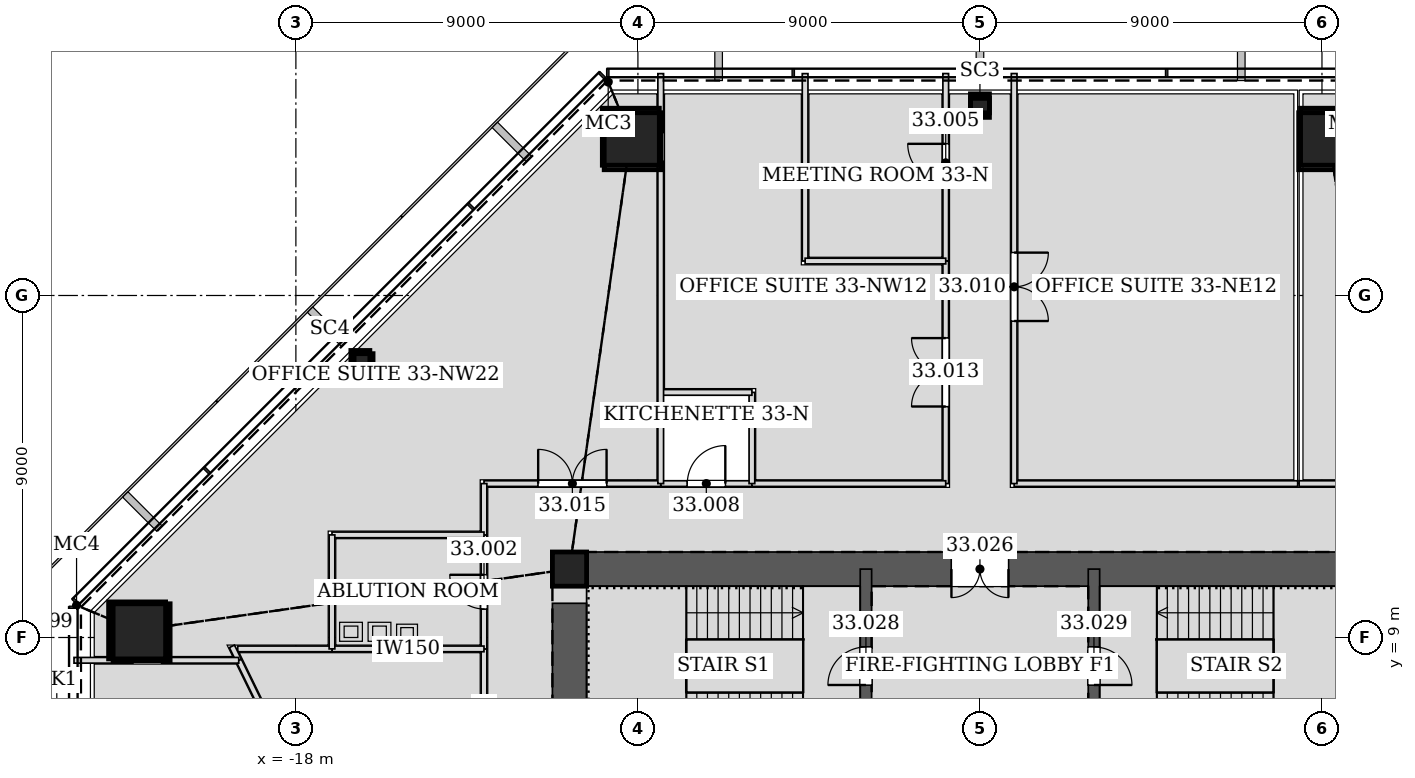
"""IFC4 building model, lengths in metres.
Left out: names, types, materials, properties, quantities, classifications, styles, units other than length and angle.
Written with IfcOpenShell. Run it as: python <this file> out.ifc"""

import sys

from ifc_helpers import new_model, si_unit, direction, frame, frame_2d, origin, origin_2d, place, context, subcontext, project, spatial, rectangle, hollow_rectangle, extrude, element, fill, save


model = new_model("IFC4")
c1 = context("Model", 3, precision=1e-05, world=origin(), true_north=direction((0.0, 1.0)))
c2 = subcontext(c1, "Body", "Model", "MODEL_VIEW")
j1 = project(units=[si_unit("LENGTHUNIT", "METRE"), si_unit("PLANEANGLEUNIT", "RADIAN")], contexts=[c1])
p1 = place(None, origin())
s1 = spatial("IfcSite", under=j1, at=p1, CompositionType="ELEMENT")
p2 = place(p1, origin())
s2 = spatial("IfcBuilding", under=s1, at=p2, CompositionType="ELEMENT")
p3 = place(p2, frame((0.0, 0.0, 147.0)))
s3 = spatial("IfcBuildingStorey", under=s2, at=p3, CompositionType="ELEMENT", Elevation=147.0)
for number, where, z_axis, x_axis in (
    (1, (9.187, 22.178, 0.0), (-0.012, -0.028, 1.0), (0.923, -0.384, 0.0)),
    (2, (-9.187, 22.178, 0.0), (0.012, -0.028, 1.0), (0.923, 0.384, 0.0)),
    (3, (-22.178, 9.187, 0.0), (0.028, -0.012, 1.0), (0.384, 0.923, 0.0)),
):
    element("IfcColumn", number, at=place(p3, frame(where, z_axis=z_axis, x_axis=x_axis)), inside=s3, PredefinedType="COLUMN", context=c2, shape_type="SweptSolid", body=[
        extrude(hollow_rectangle(XDim=1.5, YDim=1.5, WallThickness=0.07, at=origin_2d()), origin(), (0.0, 0.0, 1.0), 4.202),
    ])
for number, where, z_axis, x_axis in (
    (4, (0.0, 23.056, 0.0), (0.0, -0.028, 1.0), (1.0, 0.0, 0.0)),
    (5, (-16.303, 16.303, 0.0), (0.02, -0.02, 1.0), (0.707, 0.707, 0.0)),
):
    element("IfcColumn", number, at=place(p3, frame(where, z_axis=z_axis, x_axis=x_axis)), inside=s3, PredefinedType="COLUMN", context=c2, shape_type="SweptSolid", body=[
        extrude(hollow_rectangle(XDim=0.5, YDim=0.5, WallThickness=0.025, at=origin_2d()), origin(), (0.0, 0.0, 1.0), 4.202),
    ])
p4 = place(p3, frame((-10.8, 10.8, 0.0), z_axis=(0.0, 0.0, 1.0), x_axis=(1.0, 0.0, 0.0)))
e6 = element("IfcColumn", 6, at=p4, inside=s3, PredefinedType="COLUMN", context=c2, shape_type="SweptSolid", body=[
    extrude(hollow_rectangle(XDim=0.9, YDim=0.9, WallThickness=0.06, at=origin_2d()), origin(), (0.0, 0.0, 1.0), 4.2),
])
p5 = place(p3, frame((10.8, 10.8, 0.0), z_axis=(0.0, 0.0, 1.0), x_axis=(-1.0, 0.0, 0.0)))
e7 = element("IfcWall", 7, at=p5, inside=s3, PredefinedType="SOLIDWALL", context=c2, shape_type="SweptSolid", body=[
    extrude(rectangle(XDim=21.6, YDim=0.9, at=frame_2d((10.8, 0.0))), origin(), (0.0, 0.0, 1.0), 4.2),
])
p6 = place(p5, frame((10.05, 0.0, 0.0)))
e8 = element("IfcOpeningElement", 8, at=p6, cuts=e7, PredefinedType="OPENING", context=c2, shape_type="SweptSolid", body=[
    extrude(rectangle(XDim=1.5, YDim=2.1, at=frame_2d((0.75, 1.05))), frame((0.0, 0.46, 0.0), z_axis=(0.0, -1.0, 0.0), x_axis=(1.0, 0.0, 0.0)), (0.0, 0.0, 1.0), 0.92),
])
p7 = place(p3, frame((-10.8, 10.8, 0.0), z_axis=(0.0, 0.0, 1.0), x_axis=(0.0, -1.0, 0.0)))
e9 = element("IfcWall", 9, at=p7, inside=s3, PredefinedType="SOLIDWALL", context=c2, shape_type="SweptSolid", body=[
    extrude(rectangle(XDim=21.6, YDim=0.9, at=frame_2d((10.8, 0.0))), origin(), (0.0, 0.0, 1.0), 4.2),
])
p8 = place(p7, frame((8.7, 0.0, 0.0)))
e10 = element("IfcOpeningElement", 10, at=p8, cuts=e9, PredefinedType="OPENING", context=c2, shape_type="SweptSolid", body=[
    extrude(rectangle(XDim=1.2, YDim=2.1, at=frame_2d((0.6, 1.05))), frame((0.0, 0.46, 0.0), z_axis=(0.0, -1.0, 0.0), x_axis=(1.0, 0.0, 0.0)), (0.0, 0.0, 1.0), 0.92),
])
p9 = place(p7, frame((11.7, 0.0, 0.0)))
e11 = element("IfcOpeningElement", 11, at=p9, cuts=e9, PredefinedType="OPENING", context=c2, shape_type="SweptSolid", body=[
    extrude(rectangle(XDim=1.2, YDim=2.1, at=frame_2d((0.6, 1.05))), frame((0.0, 0.46, 0.0), z_axis=(0.0, -1.0, 0.0), x_axis=(1.0, 0.0, 0.0)), (0.0, 0.0, 1.0), 0.92),
])
p10 = place(p3, frame((-3.0, 6.0, 0.0), z_axis=(0.0, 0.0, 1.0), x_axis=(0.0, 1.0, 0.0)))
e12 = element("IfcWall", 12, at=p10, inside=s3, PredefinedType="SOLIDWALL", context=c2, shape_type="SweptSolid", body=[
    extrude(rectangle(XDim=4.8, YDim=0.3, at=frame_2d((2.4, 0.0))), origin(), (0.0, 0.0, 1.0), 4.2),
])
p11 = place(p10, frame((1.75, 0.0, 0.0)))
e13 = element("IfcOpeningElement", 13, at=p11, cuts=e12, PredefinedType="OPENING", context=c2, shape_type="SweptSolid", body=[
    extrude(rectangle(XDim=1.0, YDim=2.1, at=frame_2d((0.5, 1.05))), frame((0.0, 0.16, 0.0), z_axis=(0.0, -1.0, 0.0), x_axis=(1.0, 0.0, 0.0)), (0.0, 0.0, 1.0), 0.32),
])
p12 = place(p3, frame((3.0, 6.0, 0.0), z_axis=(0.0, 0.0, 1.0), x_axis=(0.0, 1.0, 0.0)))
e14 = element("IfcWall", 14, at=p12, inside=s3, PredefinedType="SOLIDWALL", context=c2, shape_type="SweptSolid", body=[
    extrude(rectangle(XDim=4.8, YDim=0.3, at=frame_2d((2.4, 0.0))), origin(), (0.0, 0.0, 1.0), 4.2),
])
p13 = place(p12, frame((1.75, 0.0, 0.0)))
e15 = element("IfcOpeningElement", 15, at=p13, cuts=e14, PredefinedType="OPENING", context=c2, shape_type="SweptSolid", body=[
    extrude(rectangle(XDim=1.0, YDim=2.1, at=frame_2d((0.5, 1.05))), frame((0.0, 0.16, 0.0), z_axis=(0.0, -1.0, 0.0), x_axis=(1.0, 0.0, 0.0)), (0.0, 0.0, 1.0), 0.32),
])
p14 = place(p3, frame((-13.05, 8.701, 0.0), z_axis=(0.0, 0.0, 1.0), x_axis=(0.0, -1.0, 0.0)))
e16 = element("IfcWall", 16, at=p14, inside=s3, PredefinedType="PARTITIONING", context=c2, shape_type="SweptSolid", body=[
    extrude(rectangle(XDim=7.801, YDim=0.15, at=frame_2d((3.9, 0.0))), origin(), (0.0, 0.0, 1.0), 4.035),
])
p15 = place(p14, frame((3.4, 0.0, 0.0)))
e17 = element("IfcOpeningElement", 17, at=p15, cuts=e16, PredefinedType="OPENING", context=c2, shape_type="SweptSolid", body=[
    extrude(rectangle(XDim=1.0, YDim=2.1, at=frame_2d((0.5, 1.05))), frame((0.0, 0.085, 0.0), z_axis=(0.0, -1.0, 0.0), x_axis=(1.0, 0.0, 0.0)), (0.0, 0.0, 1.0), 0.17),
])
p16 = place(p3, frame((-13.05, 11.701, 0.0), z_axis=(0.0, 0.0, 1.0), x_axis=(0.0, -1.0, 0.0)))
e18 = element("IfcWall", 18, at=p16, inside=s3, PredefinedType="PARTITIONING", context=c2, shape_type="SweptSolid", body=[
    extrude(rectangle(XDim=3.002, YDim=0.15, at=frame_2d((1.501, 0.0))), origin(), (0.0, 0.0, 1.0), 3.098),
])
p17 = place(p16, frame((1.051, 0.0, 0.0)))
e19 = element("IfcOpeningElement", 19, at=p17, cuts=e18, PredefinedType="OPENING", context=c2, shape_type="SweptSolid", body=[
    extrude(rectangle(XDim=0.9, YDim=2.1, at=frame_2d((0.45, 1.05))), frame((0.0, 0.085, 0.0), z_axis=(0.0, -1.0, 0.0), x_axis=(1.0, 0.0, 0.0)), (0.0, 0.0, 1.0), 0.17),
])
p18 = place(p3, frame((-0.9, 23.84, 0.0), z_axis=(0.0, 0.0, 1.0), x_axis=(0.0, -1.0, 0.0)))
e20 = element("IfcWall", 20, at=p18, inside=s3, PredefinedType="PARTITIONING", context=c2, shape_type="SweptSolid", body=[
    extrude(rectangle(XDim=4.935, YDim=0.15, at=frame_2d((2.468, 0.0))), origin(), (0.0, 0.0, 1.0), 3.426),
])
p19 = place(p18, frame((1.85, 0.0, 0.0)))
e21 = element("IfcOpeningElement", 21, at=p19, cuts=e20, PredefinedType="OPENING", context=c2, shape_type="SweptSolid", body=[
    extrude(rectangle(XDim=1.0, YDim=2.1, at=frame_2d((0.5, 1.05))), frame((0.0, 0.085, 0.0), z_axis=(0.0, -1.0, 0.0), x_axis=(1.0, 0.0, 0.0)), (0.0, 0.0, 1.0), 0.17),
])
p20 = place(p3, frame((-5.999, 13.05, 0.0), z_axis=(0.0, 0.0, 1.0), x_axis=(-1.0, 0.0, 0.0)))
e22 = element("IfcWall", 22, at=p20, inside=s3, PredefinedType="PARTITIONING", context=c2, shape_type="SweptSolid", body=[
    extrude(rectangle(XDim=2.402, YDim=0.15, at=frame_2d((1.201, 0.0))), origin(), (0.0, 0.0, 1.0), 4.035),
])
p21 = place(p20, frame((0.701, 0.0, 0.0)))
e23 = element("IfcOpeningElement", 23, at=p21, cuts=e22, PredefinedType="OPENING", context=c2, shape_type="SweptSolid", body=[
    extrude(rectangle(XDim=1.0, YDim=2.1, at=frame_2d((0.5, 1.05))), frame((0.0, 0.085, 0.0), z_axis=(0.0, -1.0, 0.0), x_axis=(1.0, 0.0, 0.0)), (0.0, 0.0, 1.0), 0.17),
])
p22 = place(p3, frame((8.361, 13.05, 0.0), z_axis=(0.0, 0.0, 1.0), x_axis=(-1.0, 0.0, 0.0)))
e24 = element("IfcWall", 24, at=p22, inside=s3, PredefinedType="PARTITIONING", context=c2, shape_type="SweptSolid", body=[
    extrude(rectangle(XDim=7.461, YDim=0.15, at=frame_2d((3.73, 0.0))), origin(), (0.0, 0.0, 1.0), 4.035),
])
p23 = place(p3, frame((0.9, 13.05, 0.0), z_axis=(0.0, 0.0, 1.0), x_axis=(0.0, 1.0, 0.0)))
e25 = element("IfcWall", 25, at=p23, inside=s3, PredefinedType="PARTITIONING", context=c2, shape_type="SweptSolid", body=[
    extrude(rectangle(XDim=10.79, YDim=0.15, at=frame_2d((5.395, 0.0))), origin(), (0.0, 0.0, 1.0), 3.426),
])
p24 = place(p23, frame((4.278, 0.0, 0.0)))
e26 = element("IfcOpeningElement", 26, at=p24, cuts=e25, PredefinedType="OPENING", context=c2, shape_type="SweptSolid", body=[
    extrude(rectangle(XDim=1.8, YDim=2.4, at=frame_2d((0.9, 1.2))), frame((0.0, 0.085, 0.0), z_axis=(0.0, -1.0, 0.0), x_axis=(1.0, 0.0, 0.0)), (0.0, 0.0, 1.0), 0.17),
])
p25 = place(p3, frame((13.05, 13.05, 0.0), z_axis=(0.0, 0.0, 1.0), x_axis=(-1.0, 0.0, 0.0)))
e27 = element("IfcWall", 27, at=p25, inside=s3, PredefinedType="PARTITIONING", context=c2, shape_type="SweptSolid", body=[
    extrude(rectangle(XDim=4.651, YDim=0.15, at=frame_2d((2.326, 0.0))), origin(), (0.0, 0.0, 1.0), 3.098),
])
p26 = place(p3, frame((-0.9, 18.907, 0.0), z_axis=(0.0, 0.0, 1.0), x_axis=(0.0, -1.0, 0.0)))
e28 = element("IfcWall", 28, at=p26, inside=s3, PredefinedType="PARTITIONING", context=c2, shape_type="SweptSolid", body=[
    extrude(rectangle(XDim=5.857, YDim=0.15, at=frame_2d((2.929, 0.0))), origin(), (0.0, 0.0, 1.0), 3.426),
])
p27 = place(p26, frame((2.029, 0.0, 0.0)))
e29 = element("IfcOpeningElement", 29, at=p27, cuts=e28, PredefinedType="OPENING", context=c2, shape_type="SweptSolid", body=[
    extrude(rectangle(XDim=1.8, YDim=2.4, at=frame_2d((0.9, 1.2))), frame((0.0, 0.085, 0.0), z_axis=(0.0, -1.0, 0.0), x_axis=(1.0, 0.0, 0.0)), (0.0, 0.0, 1.0), 0.17),
])
p28 = place(p3, frame((-0.9, 13.05, 0.0), z_axis=(0.0, 0.0, 1.0), x_axis=(-1.0, 0.0, 0.0)))
e30 = element("IfcWall", 30, at=p28, inside=s3, PredefinedType="PARTITIONING", context=c2, shape_type="SweptSolid", body=[
    extrude(rectangle(XDim=5.101, YDim=0.15, at=frame_2d((2.551, 0.0))), origin(), (0.0, 0.0, 1.0), 4.035),
])
p29 = place(p3, frame((-8.399, 13.05, 0.0), z_axis=(0.0, 0.0, 1.0), x_axis=(-1.0, 0.0, 0.0)))
e31 = element("IfcWall", 31, at=p29, inside=s3, PredefinedType="PARTITIONING", context=c2, shape_type="SweptSolid", body=[
    extrude(rectangle(XDim=4.651, YDim=0.15, at=frame_2d((2.326, 0.0))), origin(), (0.0, 0.0, 1.0), 3.098),
])
p30 = place(p29, frame((1.426, 0.0, 0.0)))
e32 = element("IfcOpeningElement", 32, at=p30, cuts=e31, PredefinedType="OPENING", context=c2, shape_type="SweptSolid", body=[
    extrude(rectangle(XDim=1.8, YDim=2.4, at=frame_2d((0.9, 1.2))), frame((0.0, 0.085, 0.0), z_axis=(0.0, -1.0, 0.0), x_axis=(1.0, 0.0, 0.0)), (0.0, 0.0, 1.0), 0.17),
])
p31 = place(p3, frame((-13.05, 13.05, 0.0), z_axis=(0.0, 0.0, 1.0), x_axis=(0.0, -1.0, 0.0)))
e33 = element("IfcWall", 33, at=p31, inside=s3, PredefinedType="PARTITIONING", context=c2, shape_type="SweptSolid", body=[
    extrude(rectangle(XDim=1.351, YDim=0.15, at=frame_2d((0.676, 0.0))), origin(), (0.0, 0.0, 1.0), 3.263),
])
p32 = place(p3, frame((-13.05, 8.7, 0.0), z_axis=(0.0, 0.0, 1.0), x_axis=(-1.0, 0.0, 0.0)))
e34 = element("IfcWall", 34, at=p32, inside=s3, PredefinedType="PARTITIONING", context=c2, shape_type="SweptSolid", body=[
    extrude(rectangle(XDim=4.001, YDim=0.15, at=frame_2d((2.0, 0.0))), origin(), (0.0, 0.0, 1.0), 3.426),
])
p33 = place(p3, frame((-19.503, 8.398, 0.0), z_axis=(0.0, 0.0, 1.0), x_axis=(0.438377506249, -0.898790944555, 0.0)))
e35 = element("IfcWall", 35, at=p33, inside=s3, PredefinedType="PARTITIONING", context=c2, shape_type="SweptSolid", body=[
    extrude(rectangle(XDim=8.343, YDim=0.15, at=frame_2d((4.171, 0.0))), origin(), (0.0, 0.0, 1.0), 3.499),
])
p34 = place(p3, frame((-17.049, 8.7, 0.0), z_axis=(0.0, 0.0, 1.0), x_axis=(-1.0, 0.0, 0.0)))
e36 = element("IfcWall", 36, at=p34, inside=s3, PredefinedType="PARTITIONING", context=c2, shape_type="SweptSolid", body=[
    extrude(rectangle(XDim=2.481, YDim=0.15, at=frame_2d((1.24, 0.0))), origin(), (0.0, 0.0, 1.0), 3.499),
])
p35 = place(p3, frame((-19.683, 8.767, 0.0), z_axis=(0.0, 0.0, 1.0), x_axis=(0.438376691605, -0.898791341891, 0.0)))
e37 = element("IfcWall", 37, at=p35, inside=s3, PredefinedType="PARTITIONING", context=c2, shape_type="SweptSolid", body=[
    extrude(rectangle(XDim=0.41, YDim=0.15, at=frame_2d((0.205, 0.0))), origin(), (0.0, 0.0, 1.0), 4.035),
])
p36 = place(p3, frame((-13.05, 11.7, 0.0), z_axis=(0.0, 0.0, 1.0), x_axis=(-1.0, 0.0, 0.0)))
e38 = element("IfcWall", 38, at=p36, inside=s3, PredefinedType="PARTITIONING", context=c2, shape_type="SweptSolid", body=[
    extrude(rectangle(XDim=4.0, YDim=0.15, at=frame_2d((2.0, 0.0))), origin(), (0.0, 0.0, 1.0), 3.499),
])
p37 = place(p3, frame((-17.05, 11.7, 0.0), z_axis=(0.0, 0.0, 1.0), x_axis=(0.0, -1.0, 0.0)))
e39 = element("IfcWall", 39, at=p37, inside=s3, PredefinedType="PARTITIONING", context=c2, shape_type="SweptSolid", body=[
    extrude(rectangle(XDim=3.0, YDim=0.15, at=frame_2d((1.5, 0.0))), origin(), (0.0, 0.0, 1.0), 3.098),
])
p38 = place(p3, frame((-4.6, 23.838, 0.0), z_axis=(0.0, 0.0, 1.0), x_axis=(0.0, -1.0, 0.0)))
e40 = element("IfcWall", 40, at=p38, inside=s3, PredefinedType="PARTITIONING", context=c2, shape_type="SweptSolid", body=[
    extrude(rectangle(XDim=4.932, YDim=0.15, at=frame_2d((2.466, 0.0))), origin(), (0.0, 0.0, 1.0), 3.426),
])
p39 = place(p3, frame((-4.6, 18.906, 0.0), z_axis=(0.0, 0.0, 1.0), x_axis=(1.0, 0.0, 0.0)))
e41 = element("IfcWall", 41, at=p39, inside=s3, PredefinedType="PARTITIONING", context=c2, shape_type="SweptSolid", body=[
    extrude(rectangle(XDim=3.7, YDim=0.15, at=frame_2d((1.85, 0.0))), origin(), (0.0, 0.0, 1.0), 4.035),
])
p40 = place(p3, frame((-6.0, 13.05, 0.0), z_axis=(0.0, 0.0, 1.0), x_axis=(0.0, 1.0, 0.0)))
e42 = element("IfcWall", 42, at=p40, inside=s3, PredefinedType="PARTITIONING", context=c2, shape_type="SweptSolid", body=[
    extrude(rectangle(XDim=2.4, YDim=0.15, at=frame_2d((1.2, 0.0))), origin(), (0.0, 0.0, 1.0), 3.426),
])
p41 = place(p3, frame((-6.0, 15.45, 0.0), z_axis=(0.0, 0.0, 1.0), x_axis=(-1.0, 0.0, 0.0)))
e43 = element("IfcWall", 43, at=p41, inside=s3, PredefinedType="PARTITIONING", context=c2, shape_type="SweptSolid", body=[
    extrude(rectangle(XDim=2.4, YDim=0.15, at=frame_2d((1.2, 0.0))), origin(), (0.0, 0.0, 1.0), 4.035),
])
p42 = place(p3, frame((-8.4, 13.05, 0.0), z_axis=(0.0, 0.0, 1.0), x_axis=(0.0, 1.0, 0.0)))
e44 = element("IfcWall", 44, at=p42, inside=s3, PredefinedType="PARTITIONING", context=c2, shape_type="SweptSolid", body=[
    extrude(rectangle(XDim=8.482, YDim=0.15, at=frame_2d((4.241, 0.0))), origin(), (0.0, 0.0, 1.0), 3.426),
])
p43 = place(p3, frame((-8.4, 23.838, 0.0), z_axis=(0.0, 0.0, 1.0), x_axis=(0.0, -1.0, 0.0)))
e45 = element("IfcWall", 45, at=p43, inside=s3, PredefinedType="PARTITIONING", context=c2, shape_type="SweptSolid", body=[
    extrude(rectangle(XDim=1.55, YDim=0.15, at=frame_2d((0.775, 0.0))), origin(), (0.0, 0.0, 1.0), 4.035),
])
p44 = place(p3, frame((-19.504, 8.4, 0.0), z_axis=(0.0, 0.0, 1.0), x_axis=(-1.0, 0.0, 0.0)))
e46 = element("IfcWall", 46, at=p44, inside=s3, PredefinedType="PARTITIONING", context=c2, shape_type="SweptSolid", body=[
    extrude(rectangle(XDim=2.028, YDim=0.15, at=frame_2d((1.014, 0.0))), origin(), (0.0, 0.0, 1.0), 3.426),
])
p45 = place(p3, frame((-22.289, 8.4, 0.0), z_axis=(0.0, 0.0, 1.0), x_axis=(-1.0, 0.0, 0.0)))
e47 = element("IfcWall", 47, at=p45, inside=s3, PredefinedType="PARTITIONING", context=c2, shape_type="SweptSolid", body=[
    extrude(rectangle(XDim=1.55, YDim=0.15, at=frame_2d((0.775, 0.0))), origin(), (0.0, 0.0, 1.0), 4.035),
])
p46 = place(p17, frame((0.9, 0.0, 0.0), z_axis=(0.0, 0.0, 1.0), x_axis=(-1.0, 0.0, 0.0)))
e48 = element("IfcDoor", 48, at=p46, inside=s3, OperationType="SINGLE_SWING_RIGHT", PredefinedType="DOOR", context=c2, shape_type="SweptSolid", body=[
    extrude(rectangle(XDim=0.9, YDim=2.1, at=frame_2d((0.45, 1.05))), frame((0.0, 0.025, 0.0), z_axis=(0.0, -1.0, 0.0), x_axis=(1.0, 0.0, 0.0)), (0.0, 0.0, 1.0), 0.05),
])
fill(e19, e48)
p47 = place(p19, frame((1.0, 0.0, 0.0), z_axis=(0.0, 0.0, 1.0), x_axis=(-1.0, 0.0, 0.0)))
e49 = element("IfcDoor", 49, at=p47, inside=s3, OperationType="SINGLE_SWING_RIGHT", PredefinedType="DOOR", context=c2, shape_type="SweptSolid", body=[
    extrude(rectangle(XDim=1.0, YDim=2.1, at=frame_2d((0.5, 1.05))), frame((0.0, 0.025, 0.0), z_axis=(0.0, -1.0, 0.0), x_axis=(1.0, 0.0, 0.0)), (0.0, 0.0, 1.0), 0.05),
])
fill(e21, e49)
p48 = place(p21, frame((1.0, 0.0, 0.0), z_axis=(0.0, 0.0, 1.0), x_axis=(-1.0, 0.0, 0.0)))
e50 = element("IfcDoor", 50, at=p48, inside=s3, OperationType="SINGLE_SWING_RIGHT", PredefinedType="DOOR", context=c2, shape_type="SweptSolid", body=[
    extrude(rectangle(XDim=1.0, YDim=2.1, at=frame_2d((0.5, 1.05))), frame((0.0, 0.025, 0.0), z_axis=(0.0, -1.0, 0.0), x_axis=(1.0, 0.0, 0.0)), (0.0, 0.0, 1.0), 0.05),
])
fill(e23, e50)
p49 = place(p24, frame((1.8, 0.0, 0.0), z_axis=(0.0, 0.0, 1.0), x_axis=(-1.0, 0.0, 0.0)))
e51 = element("IfcDoor", 51, at=p49, inside=s3, OperationType="DOUBLE_DOOR_SINGLE_SWING", PredefinedType="DOOR", context=c2, shape_type="SweptSolid", body=[
    extrude(rectangle(XDim=1.8, YDim=2.4, at=frame_2d((0.9, 1.2))), frame((0.0, 0.025, 0.0), z_axis=(0.0, -1.0, 0.0), x_axis=(1.0, 0.0, 0.0)), (0.0, 0.0, 1.0), 0.05),
])
fill(e26, e51)
p50 = place(p27, frame((1.8, 0.0, 0.0), z_axis=(0.0, 0.0, 1.0), x_axis=(-1.0, 0.0, 0.0)))
e52 = element("IfcDoor", 52, at=p50, inside=s3, OperationType="DOUBLE_DOOR_SINGLE_SWING", PredefinedType="DOOR", context=c2, shape_type="SweptSolid", body=[
    extrude(rectangle(XDim=1.8, YDim=2.4, at=frame_2d((0.9, 1.2))), frame((0.0, 0.025, 0.0), z_axis=(0.0, -1.0, 0.0), x_axis=(1.0, 0.0, 0.0)), (0.0, 0.0, 1.0), 0.05),
])
fill(e29, e52)
p51 = place(p30, frame((1.8, 0.0, 0.0), z_axis=(0.0, 0.0, 1.0), x_axis=(-1.0, 0.0, 0.0)))
e53 = element("IfcDoor", 53, at=p51, inside=s3, OperationType="DOUBLE_DOOR_SINGLE_SWING", PredefinedType="DOOR", context=c2, shape_type="SweptSolid", body=[
    extrude(rectangle(XDim=1.8, YDim=2.4, at=frame_2d((0.9, 1.2))), frame((0.0, 0.025, 0.0), z_axis=(0.0, -1.0, 0.0), x_axis=(1.0, 0.0, 0.0)), (0.0, 0.0, 1.0), 0.05),
])
fill(e32, e53)
p52 = place(p6, origin())
e54 = element("IfcDoor", 54, at=p52, inside=s3, OperationType="DOUBLE_DOOR_SINGLE_SWING", PredefinedType="DOOR", context=c2, shape_type="SweptSolid", body=[
    extrude(rectangle(XDim=1.5, YDim=2.1, at=frame_2d((0.75, 1.05))), frame((0.0, 0.025, 0.0), z_axis=(0.0, -1.0, 0.0), x_axis=(1.0, 0.0, 0.0)), (0.0, 0.0, 1.0), 0.05),
])
fill(e8, e54)
p53 = place(p11, origin())
e55 = element("IfcDoor", 55, at=p53, inside=s3, OperationType="SINGLE_SWING_LEFT", PredefinedType="DOOR", context=c2, shape_type="SweptSolid", body=[
    extrude(rectangle(XDim=1.0, YDim=2.1, at=frame_2d((0.5, 1.05))), frame((0.0, 0.025, 0.0), z_axis=(0.0, -1.0, 0.0), x_axis=(1.0, 0.0, 0.0)), (0.0, 0.0, 1.0), 0.05),
])
fill(e13, e55)
p54 = place(p13, frame((1.0, 0.0, 0.0), z_axis=(0.0, 0.0, 1.0), x_axis=(-1.0, 0.0, 0.0)))
e56 = element("IfcDoor", 56, at=p54, inside=s3, OperationType="SINGLE_SWING_RIGHT", PredefinedType="DOOR", context=c2, shape_type="SweptSolid", body=[
    extrude(rectangle(XDim=1.0, YDim=2.1, at=frame_2d((0.5, 1.05))), frame((0.0, 0.025, 0.0), z_axis=(0.0, -1.0, 0.0), x_axis=(1.0, 0.0, 0.0)), (0.0, 0.0, 1.0), 0.05),
])
fill(e15, e56)
save(model, sys.argv[1])
